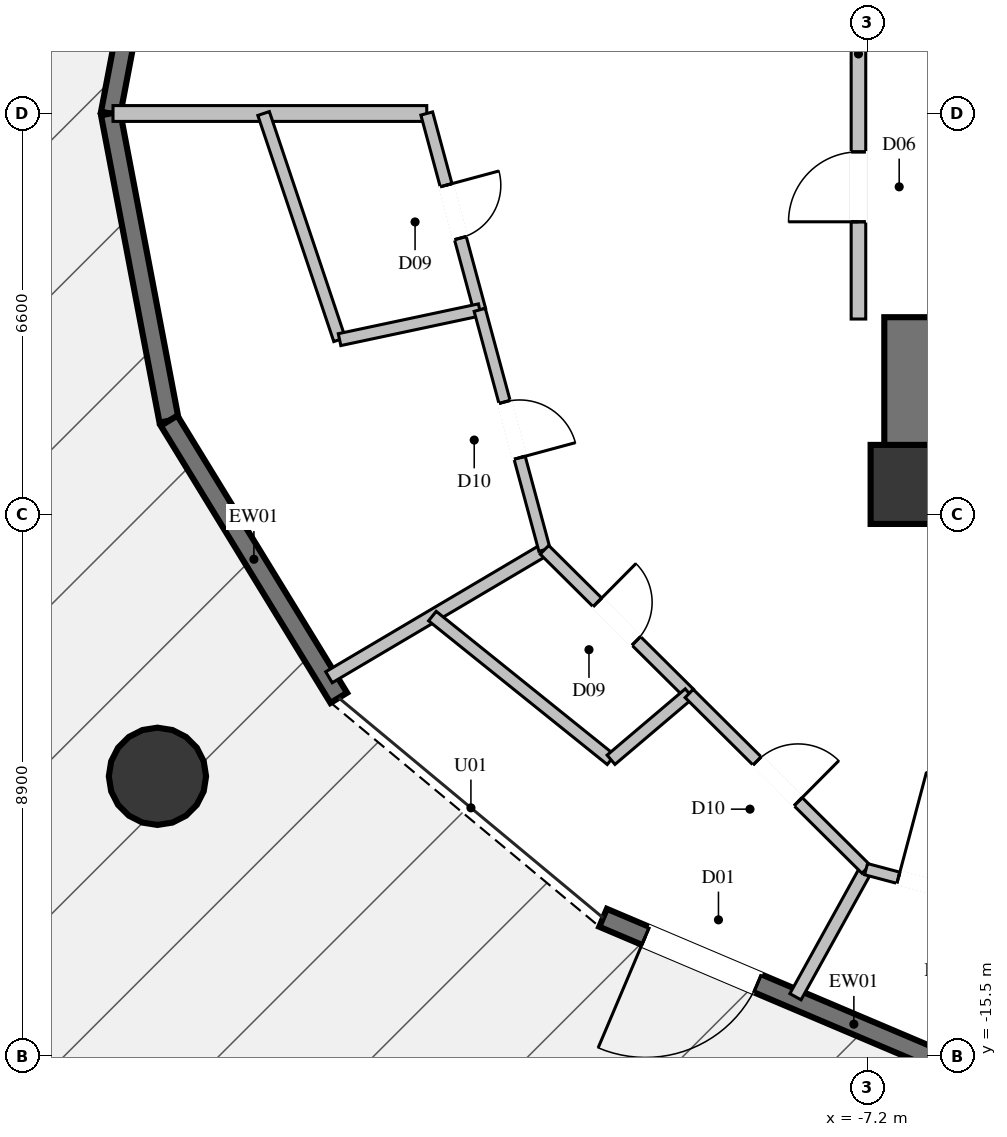
"""IFC4 building model, lengths in metres.
Left out: names, types, materials, properties, quantities, classifications, styles, units other than length and angle.
Written with IfcOpenShell. Run it as: python <this file> out.ifc"""

import sys

from ifc_helpers import new_model, si_unit, direction, frame, frame_2d, origin, origin_2d, place, context, subcontext, project, spatial, rectangle, circle, extrude, element, fill, save


model = new_model("IFC4")
c1 = context("Model", 3, precision=1e-05, world=origin(), true_north=direction((0.0, 1.0)))
c2 = subcontext(c1, "Body", "Model", "MODEL_VIEW")
j1 = project(units=[si_unit("LENGTHUNIT", "METRE"), si_unit("PLANEANGLEUNIT", "RADIAN")], contexts=[c1])
p1 = place(None, origin())
s1 = spatial("IfcSite", under=j1, at=p1, CompositionType="ELEMENT")
p2 = place(p1, origin())
s2 = spatial("IfcBuilding", under=s1, at=p2, CompositionType="ELEMENT")
p3 = place(p2, origin())
s3 = spatial("IfcBuildingStorey", under=s2, at=p3, CompositionType="ELEMENT", Elevation=0.0)
p4 = place(p3, frame((-6.5, -6.1, 0.0), z_axis=(0.0, 0.0, 1.0), x_axis=(1.0, 0.0, 0.0)))
e1 = element("IfcColumn", 1, at=p4, inside=s3, PredefinedType="COLUMN", context=c2, shape_type="SweptSolid", body=[
    extrude(rectangle(XDim=1.3, YDim=1.3, at=origin_2d()), origin(), (0.0, 0.0, 1.0), 7.2),
])
p5 = place(p3, frame((-6.5, -6.525, 0.0), z_axis=(0.0, 0.0, 1.0), x_axis=(0.0, 1.0, 0.0)))
e2 = element("IfcWall", 2, at=p5, inside=s3, PredefinedType="SHEAR", context=c2, shape_type="SweptSolid", body=[
    extrude(rectangle(XDim=3.175, YDim=0.85, at=frame_2d((1.587, 0.0))), origin(), (0.0, 0.0, 1.0), 7.2),
])
p6 = place(p3, frame((-18.879, -10.9, 0.0), z_axis=(0.0, 0.0, 1.0), x_axis=(1.0, 0.0, 0.0)))
e3 = element("IfcColumn", 3, at=p6, inside=s3, PredefinedType="COLUMN", context=c2, shape_type="SweptSolid", body=[
    extrude(circle(Radius=0.8, at=origin_2d()), origin(), (0.0, 0.0, 1.0), 7.2),
])
p7 = place(p3, frame((-19.65, 0.0, 0.0), z_axis=(0.0, 0.0, 1.0), x_axis=(0.187042300785, 0.982351860444, 0.0)))
e4 = element("IfcWall", 4, at=p7, inside=s3, PredefinedType="SOLIDWALL", context=c2, shape_type="SweptSolid", body=[
    extrude(rectangle(XDim=5.143, YDim=0.32, at=frame_2d((2.571, 0.0))), origin(), (0.0, 0.0, 1.0), 6.84),
])
p8 = place(p7, frame((1.671, 0.0, 0.0)))
e5 = element("IfcOpeningElement", 5, at=p8, cuts=e4, PredefinedType="OPENING", context=c2, shape_type="SweptSolid", body=[
    extrude(rectangle(XDim=1.8, YDim=2.4, at=frame_2d((0.9, 1.2))), frame((0.0, 0.17, 0.0), z_axis=(0.0, -1.0, 0.0), x_axis=(1.0, 0.0, 0.0)), (0.0, 0.0, 1.0), 0.34),
])
p9 = place(p3, frame((-18.688, -5.052, 0.0), z_axis=(0.0, 0.0, 1.0), x_axis=(-0.187042300785, 0.982351860444, 0.0)))
e6 = element("IfcWall", 6, at=p9, inside=s3, PredefinedType="SOLIDWALL", context=c2, shape_type="SweptSolid", body=[
    extrude(rectangle(XDim=5.143, YDim=0.32, at=frame_2d((2.571, 0.0))), origin(), (0.0, 0.0, 1.0), 6.84),
])
p10 = place(p3, frame((-15.897, -9.61, 0.0), z_axis=(0.0, 0.0, 1.0), x_axis=(-0.522199966643, 0.852823073585, 0.0)))
e7 = element("IfcWall", 7, at=p10, inside=s3, PredefinedType="SOLIDWALL", context=c2, shape_type="SweptSolid", body=[
    extrude(rectangle(XDim=5.345, YDim=0.32, at=frame_2d((2.672, 0.0))), origin(), (0.0, 0.0, 1.0), 6.84),
])
p11 = place(p3, frame((-6.072, -15.55, 0.0), z_axis=(0.0, 0.0, 1.0), x_axis=(-0.920643013012, 0.390405484839, 0.0)))
e8 = element("IfcWall", 8, at=p11, inside=s3, PredefinedType="SOLIDWALL", context=c2, shape_type="SweptSolid", body=[
    extrude(rectangle(XDim=5.95, YDim=0.32, at=frame_2d((2.975, 0.0))), origin(), (0.0, 0.0, 1.0), 6.84),
])
p12 = place(p11, frame((3.19, 0.0, 0.0)))
e9 = element("IfcOpeningElement", 9, at=p12, cuts=e8, PredefinedType="OPENING", context=c2, shape_type="SweptSolid", body=[
    extrude(rectangle(XDim=2.0, YDim=2.4, at=frame_2d((1.0, 1.2))), frame((0.0, 0.17, 0.0), z_axis=(0.0, -1.0, 0.0), x_axis=(1.0, 0.0, 0.0)), (0.0, 0.0, 1.0), 0.34),
])
p13 = place(p3, frame((-7.35, -3.38, 0.0), z_axis=(0.0, 0.0, 1.0), x_axis=(0.0, 1.0, 0.0)))
e10 = element("IfcWall", 10, at=p13, inside=s3, PredefinedType="PARTITIONING", context=c2, shape_type="SweptSolid", body=[
    extrude(rectangle(XDim=5.72, YDim=0.24, at=frame_2d((2.86, 0.0))), origin(), (0.0, 0.0, 1.0), 5.725),
])
p14 = place(p13, frame((1.599, 0.0, 0.0)))
e11 = element("IfcOpeningElement", 11, at=p14, cuts=e10, PredefinedType="OPENING", context=c2, shape_type="SweptSolid", body=[
    extrude(rectangle(XDim=1.15, YDim=2.2, at=frame_2d((0.575, 1.1))), frame((0.0, 0.13, 0.0), z_axis=(0.0, -1.0, 0.0), x_axis=(1.0, 0.0, 0.0)), (0.0, 0.0, 1.0), 0.26),
])
p15 = place(p3, frame((-14.45, 0.0, 0.0), z_axis=(0.0, 0.0, 1.0), x_axis=(-1.0, 0.0, 0.0)))
e12 = element("IfcWall", 12, at=p15, inside=s3, PredefinedType="PARTITIONING", context=c2, shape_type="SweptSolid", body=[
    extrude(rectangle(XDim=5.16, YDim=0.26, at=frame_2d((2.58, 0.0))), origin(), (0.0, 0.0, 1.0), 4.625),
])
p16 = place(p3, frame((-12.514, -7.175, 0.0), z_axis=(0.0, 0.0, 1.0), x_axis=(-0.860750596586, -0.509026925101, 0.0)))
e13 = element("IfcWall", 13, at=p16, inside=s3, PredefinedType="PARTITIONING", context=c2, shape_type="SweptSolid", body=[
    extrude(rectangle(XDim=4.118, YDim=0.21, at=frame_2d((2.059, 0.0))), origin(), (0.0, 0.0, 1.0), 4.625),
])
p17 = place(p3, frame((-7.225, -12.427, 0.0), z_axis=(0.0, 0.0, 1.0), x_axis=(-0.484172522816, -0.874972552798, 0.0)))
e14 = element("IfcWall", 14, at=p17, inside=s3, PredefinedType="PARTITIONING", context=c2, shape_type="SweptSolid", body=[
    extrude(rectangle(XDim=2.398, YDim=0.21, at=frame_2d((1.199, 0.0))), origin(), (0.0, 0.0, 1.0), 4.625),
])
p18 = place(p3, frame((-14.45, 0.0, 0.0), z_axis=(0.0, 0.0, 1.0), x_axis=(0.260392320077, -0.965502894685, 0.0)))
e15 = element("IfcWall", 15, at=p18, inside=s3, PredefinedType="PLUMBINGWALL", context=c2, shape_type="SweptSolid", body=[
    extrude(rectangle(XDim=3.344, YDim=0.2, at=frame_2d((1.672, 0.0))), origin(), (0.0, 0.0, 1.0), 6.84),
])
p19 = place(p18, frame((1.222, 0.0, 0.0)))
e16 = element("IfcOpeningElement", 16, at=p19, cuts=e15, PredefinedType="OPENING", context=c2, shape_type="SweptSolid", body=[
    extrude(rectangle(XDim=0.9, YDim=2.1, at=frame_2d((0.45, 1.05))), frame((0.0, 0.11, 0.0), z_axis=(0.0, -1.0, 0.0), x_axis=(1.0, 0.0, 0.0)), (0.0, 0.0, 1.0), 0.22),
])
p20 = place(p3, frame((-17.133, 0.0, 0.0), z_axis=(0.0, 0.0, 1.0), x_axis=(0.318373926593, -0.947965211844, 0.0)))
e17 = element("IfcWall", 17, at=p20, inside=s3, PredefinedType="PLUMBINGWALL", context=c2, shape_type="SweptSolid", body=[
    extrude(rectangle(XDim=3.923, YDim=0.2, at=frame_2d((1.961, 0.0))), origin(), (0.0, 0.0, 1.0), 6.84),
])
p21 = place(p3, frame((-13.579, -3.229, 0.0), z_axis=(0.0, 0.0, 1.0), x_axis=(-0.978142259105, -0.207936819619, 0.0)))
e18 = element("IfcWall", 18, at=p21, inside=s3, PredefinedType="PLUMBINGWALL", context=c2, shape_type="SweptSolid", body=[
    extrude(rectangle(XDim=2.356, YDim=0.2, at=frame_2d((1.178, 0.0))), origin(), (0.0, 0.0, 1.0), 6.84),
])
p22 = place(p3, frame((-13.579, -3.229, 0.0), z_axis=(0.0, 0.0, 1.0), x_axis=(0.260609621942, -0.965444262996, 0.0)))
e19 = element("IfcWall", 19, at=p22, inside=s3, PredefinedType="PARTITIONING", context=c2, shape_type="SweptSolid", body=[
    extrude(rectangle(XDim=4.087, YDim=0.19, at=frame_2d((2.044, 0.0))), origin(), (0.0, 0.0, 1.0), 6.84),
])
p23 = place(p22, frame((1.569, 0.0, 0.0)))
e20 = element("IfcOpeningElement", 20, at=p23, cuts=e19, PredefinedType="OPENING", context=c2, shape_type="SweptSolid", body=[
    extrude(rectangle(XDim=0.95, YDim=2.1, at=frame_2d((0.475, 1.05))), frame((0.0, 0.105, 0.0), z_axis=(0.0, -1.0, 0.0), x_axis=(1.0, 0.0, 0.0)), (0.0, 0.0, 1.0), 0.21),
])
p24 = place(p3, frame((-12.514, -7.175, 0.0), z_axis=(0.0, 0.0, 1.0), x_axis=(0.709613777387, -0.704590864929, 0.0)))
e21 = element("IfcWall", 21, at=p24, inside=s3, PredefinedType="PLUMBINGWALL", context=c2, shape_type="SweptSolid", body=[
    extrude(rectangle(XDim=3.354, YDim=0.2, at=frame_2d((1.677, 0.0))), origin(), (0.0, 0.0, 1.0), 6.84),
])
p25 = place(p24, frame((1.227, 0.0, 0.0)))
e22 = element("IfcOpeningElement", 22, at=p25, cuts=e21, PredefinedType="OPENING", context=c2, shape_type="SweptSolid", body=[
    extrude(rectangle(XDim=0.9, YDim=2.1, at=frame_2d((0.45, 1.05))), frame((0.0, 0.11, 0.0), z_axis=(0.0, -1.0, 0.0), x_axis=(1.0, 0.0, 0.0)), (0.0, 0.0, 1.0), 0.22),
])
p26 = place(p3, frame((-14.357, -8.265, 0.0), z_axis=(0.0, 0.0, 1.0), x_axis=(0.779229949354, -0.626738131942, 0.0)))
e23 = element("IfcWall", 23, at=p26, inside=s3, PredefinedType="PLUMBINGWALL", context=c2, shape_type="SweptSolid", body=[
    extrude(rectangle(XDim=3.77, YDim=0.2, at=frame_2d((1.885, 0.0))), origin(), (0.0, 0.0, 1.0), 6.84),
])
p27 = place(p3, frame((-10.134, -9.538, 0.0), z_axis=(0.0, 0.0, 1.0), x_axis=(-0.762621765575, -0.646844682031, 0.0)))
e24 = element("IfcWall", 24, at=p27, inside=s3, PredefinedType="PLUMBINGWALL", context=c2, shape_type="SweptSolid", body=[
    extrude(rectangle(XDim=1.685, YDim=0.2, at=frame_2d((0.842, 0.0))), origin(), (0.0, 0.0, 1.0), 6.84),
])
p28 = place(p3, frame((-10.134, -9.538, 0.0), z_axis=(0.0, 0.0, 1.0), x_axis=(0.709544136177, -0.704660995668, 0.0)))
e25 = element("IfcWall", 25, at=p28, inside=s3, PredefinedType="PARTITIONING", context=c2, shape_type="SweptSolid", body=[
    extrude(rectangle(XDim=4.1, YDim=0.19, at=frame_2d((2.05, 0.0))), origin(), (0.0, 0.0, 1.0), 6.84),
])
p29 = place(p28, frame((1.575, 0.0, 0.0)))
e26 = element("IfcOpeningElement", 26, at=p29, cuts=e25, PredefinedType="OPENING", context=c2, shape_type="SweptSolid", body=[
    extrude(rectangle(XDim=0.95, YDim=2.1, at=frame_2d((0.475, 1.05))), frame((0.0, 0.105, 0.0), z_axis=(0.0, -1.0, 0.0), x_axis=(1.0, 0.0, 0.0)), (0.0, 0.0, 1.0), 0.21),
])
p30 = place(p3, frame((-7.225, -12.427, 0.0), z_axis=(0.0, 0.0, 1.0), x_axis=(0.966354610728, -0.25721346451, 0.0)))
e27 = element("IfcWall", 27, at=p30, inside=s3, PredefinedType="PARTITIONING", context=c2, shape_type="SweptSolid", body=[
    extrude(rectangle(XDim=7.477, YDim=0.19, at=frame_2d((3.738, 0.0))), origin(), (0.0, 0.0, 1.0), 6.84),
])
p31 = place(p30, frame((0.55, 0.0, 0.0)))
e28 = element("IfcOpeningElement", 28, at=p31, cuts=e27, PredefinedType="OPENING", context=c2, shape_type="SweptSolid", body=[
    extrude(rectangle(XDim=1.8, YDim=2.4, at=frame_2d((0.9, 1.2))), frame((0.0, 0.105, 0.0), z_axis=(0.0, -1.0, 0.0), x_axis=(1.0, 0.0, 0.0)), (0.0, 0.0, 1.0), 0.21),
])
p32 = place(p30, frame((4.927, 0.0, 0.9)))
e29 = element("IfcOpeningElement", 29, at=p32, cuts=e27, PredefinedType="OPENING", context=c2, shape_type="SweptSolid", body=[
    extrude(rectangle(XDim=2.0, YDim=1.6, at=frame_2d((1.0, 0.8))), frame((0.0, 0.105, 0.0), z_axis=(0.0, -1.0, 0.0), x_axis=(1.0, 0.0, 0.0)), (0.0, 0.0, 1.0), 0.21),
])
p33 = place(p12, origin())
e30 = element("IfcDoor", 30, at=p33, inside=s3, OperationType="SINGLE_SWING_RIGHT", PredefinedType="DOOR", context=c2, shape_type="SweptSolid", body=[
    extrude(rectangle(XDim=2.0, YDim=2.4, at=frame_2d((1.0, 1.2))), frame((0.0, 0.025, 0.0), z_axis=(0.0, -1.0, 0.0), x_axis=(1.0, 0.0, 0.0)), (0.0, 0.0, 1.0), 0.05),
])
fill(e9, e30)
p34 = place(p14, origin())
e31 = element("IfcDoor", 31, at=p34, inside=s3, OperationType="SINGLE_SWING_LEFT", PredefinedType="DOOR", context=c2, shape_type="SweptSolid", body=[
    extrude(rectangle(XDim=1.15, YDim=2.2, at=frame_2d((0.575, 1.1))), frame((0.0, 0.025, 0.0), z_axis=(0.0, -1.0, 0.0), x_axis=(1.0, 0.0, 0.0)), (0.0, 0.0, 1.0), 0.05),
])
fill(e11, e31)
p35 = place(p19, origin())
e32 = element("IfcDoor", 32, at=p35, inside=s3, OperationType="SINGLE_SWING_LEFT", PredefinedType="DOOR", context=c2, shape_type="SweptSolid", body=[
    extrude(rectangle(XDim=0.9, YDim=2.1, at=frame_2d((0.45, 1.05))), frame((0.0, 0.025, 0.0), z_axis=(0.0, -1.0, 0.0), x_axis=(1.0, 0.0, 0.0)), (0.0, 0.0, 1.0), 0.05),
])
fill(e16, e32)
p36 = place(p23, origin())
e33 = element("IfcDoor", 33, at=p36, inside=s3, OperationType="SINGLE_SWING_RIGHT", PredefinedType="DOOR", context=c2, shape_type="SweptSolid", body=[
    extrude(rectangle(XDim=0.95, YDim=2.1, at=frame_2d((0.475, 1.05))), frame((0.0, 0.025, 0.0), z_axis=(0.0, -1.0, 0.0), x_axis=(1.0, 0.0, 0.0)), (0.0, 0.0, 1.0), 0.05),
])
fill(e20, e33)
p37 = place(p25, origin())
e34 = element("IfcDoor", 34, at=p37, inside=s3, OperationType="SINGLE_SWING_LEFT", PredefinedType="DOOR", context=c2, shape_type="SweptSolid", body=[
    extrude(rectangle(XDim=0.9, YDim=2.1, at=frame_2d((0.45, 1.05))), frame((0.0, 0.025, 0.0), z_axis=(0.0, -1.0, 0.0), x_axis=(1.0, 0.0, 0.0)), (0.0, 0.0, 1.0), 0.05),
])
fill(e22, e34)
p38 = place(p29, origin())
e35 = element("IfcDoor", 35, at=p38, inside=s3, OperationType="SINGLE_SWING_RIGHT", PredefinedType="DOOR", context=c2, shape_type="SweptSolid", body=[
    extrude(rectangle(XDim=0.95, YDim=2.1, at=frame_2d((0.475, 1.05))), frame((0.0, 0.025, 0.0), z_axis=(0.0, -1.0, 0.0), x_axis=(1.0, 0.0, 0.0)), (0.0, 0.0, 1.0), 0.05),
])
fill(e26, e35)
p39 = place(p31, origin())
e36 = element("IfcDoor", 36, at=p39, inside=s3, OperationType="SINGLE_SWING_LEFT", PredefinedType="DOOR", context=c2, shape_type="SweptSolid", body=[
    extrude(rectangle(XDim=1.8, YDim=2.4, at=frame_2d((0.9, 1.2))), frame((0.0, 0.025, 0.0), z_axis=(0.0, -1.0, 0.0), x_axis=(1.0, 0.0, 0.0)), (0.0, 0.0, 1.0), 0.05),
])
fill(e28, e36)
save(model, sys.argv[1])
